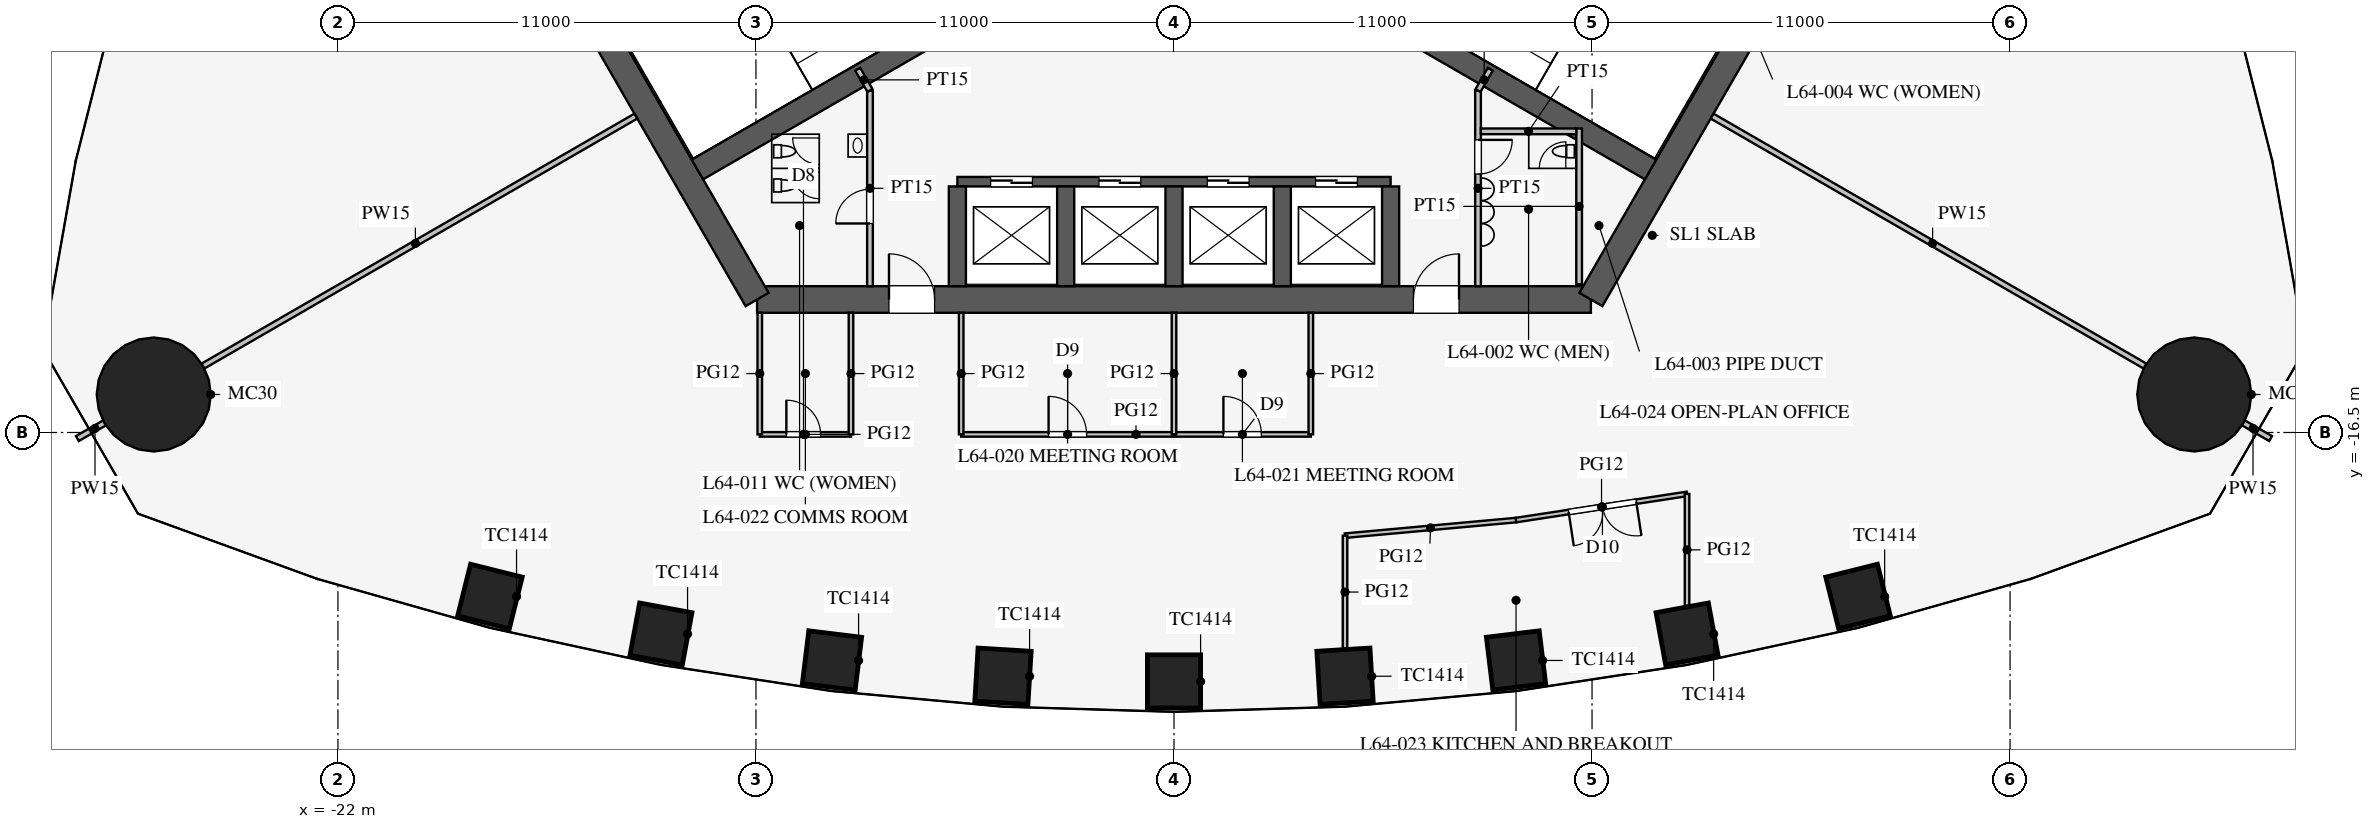
"""IFC4 building model, lengths in metres.
Left out: names, types, materials, properties, quantities, classifications, styles, units other than length and angle.
Written with IfcOpenShell. Run it as: python <this file> out.ifc"""

import sys

from ifc_helpers import new_model, si_unit, direction, frame, frame_2d, origin, origin_2d, place, context, subcontext, project, spatial, rectangle, circle, extrude, element, fill, save


model = new_model("IFC4")
c1 = context("Model", 3, precision=1e-05, world=origin(), true_north=direction((0.0, 1.0)))
c2 = subcontext(c1, "Body", "Model", "MODEL_VIEW")
j1 = project(units=[si_unit("LENGTHUNIT", "METRE"), si_unit("PLANEANGLEUNIT", "RADIAN")], contexts=[c1])
p1 = place(None, origin())
s1 = spatial("IfcSite", under=j1, at=p1, CompositionType="ELEMENT")
p2 = place(p1, origin())
s2 = spatial("IfcBuilding", under=s1, at=p2, CompositionType="ELEMENT")
p3 = place(p2, frame((0.0, 0.0, 280.5)))
s3 = spatial("IfcBuildingStorey", under=s2, at=p3, CompositionType="ELEMENT", Elevation=280.5)
for number, where, z_axis, x_axis in (
    (1, (-18.0, -20.816, 0.0), (0.0, 0.0, 1.0), (0.97, -0.242, 0.0)),
    (2, (-13.5, -21.803, 0.0), (0.0, 0.0, 1.0), (0.983, -0.182, 0.0)),
    (3, (-9.0, -22.499, 0.0), (0.0, 0.0, 1.0), (0.993, -0.121, 0.0)),
    (4, (-4.5, -22.914, 0.0), (0.0, 0.0, 1.0), (0.998, -0.061, 0.0)),
    (5, (0.0, -23.052, 0.0), (0.0, 0.0, 1.0), (1.0, 0.0, 0.0)),
    (6, (4.5, -22.914, 0.0), (0.0, 0.0, 1.0), (0.998, 0.061, 0.0)),
    (7, (9.0, -22.499, 0.0), (0.0, 0.0, 1.0), (0.993, 0.121, 0.0)),
    (8, (13.5, -21.803, 0.0), (0.0, 0.0, 1.0), (0.983, 0.182, 0.0)),
    (9, (18.0, -20.816, 0.0), (0.0, 0.0, 1.0), (0.97, 0.242, 0.0)),
):
    element("IfcColumn", number, at=place(p3, frame(where, z_axis=z_axis, x_axis=x_axis)), inside=s3, PredefinedType="COLUMN", context=c2, shape_type="SweptSolid", body=[
        extrude(rectangle(XDim=1.4, YDim=1.4, at=origin_2d()), origin(), (0.0, 0.0, 1.0), 4.2),
    ])
for number, where, z_axis, x_axis in (
    (10, (26.847, -15.5, 0.0), (0.0, 0.0, 1.0), (1.0, 0.0, 0.0)),
    (11, (-26.847, -15.5, 0.0), (0.0, 0.0, 1.0), (1.0, 0.0, 0.0)),
):
    element("IfcColumn", number, at=place(p3, frame(where, z_axis=z_axis, x_axis=x_axis)), inside=s3, PredefinedType="COLUMN", context=c2, shape_type="SweptSolid", body=[
        extrude(circle(Radius=1.5, at=origin_2d()), origin(), (0.0, 0.0, 1.0), 4.2),
    ])
p4 = place(p3, frame((-10.97, -13.0, 0.0), z_axis=(0.0, 0.0, 1.0), x_axis=(1.0, 0.0, 0.0)))
e12 = element("IfcWall", 12, at=p4, inside=s3, PredefinedType="SHEAR", context=c2, shape_type="SweptSolid", body=[
    extrude(rectangle(XDim=21.939, YDim=0.7, at=frame_2d((10.97, 0.0))), origin(), (0.0, 0.0, 1.0), 4.2),
])
p5 = place(p4, frame((17.27, 0.0, 0.0)))
e13 = element("IfcOpeningElement", 13, at=p5, cuts=e12, PredefinedType="OPENING", context=c2, shape_type="SweptSolid", body=[
    extrude(rectangle(XDim=1.2, YDim=2.1, at=frame_2d((0.6, 1.05))), frame((0.0, 0.36, 0.0), z_axis=(0.0, -1.0, 0.0), x_axis=(1.0, 0.0, 0.0)), (0.0, 0.0, 1.0), 0.72),
])
p6 = place(p4, frame((3.47, 0.0, 0.0)))
e14 = element("IfcOpeningElement", 14, at=p6, cuts=e12, PredefinedType="OPENING", context=c2, shape_type="SweptSolid", body=[
    extrude(rectangle(XDim=1.2, YDim=2.1, at=frame_2d((0.6, 1.05))), frame((0.0, 0.36, 0.0), z_axis=(0.0, -1.0, 0.0), x_axis=(1.0, 0.0, 0.0)), (0.0, 0.0, 1.0), 0.72),
])
for number, where, z_axis, x_axis in (
    (15, (10.97, -13.0, 0.0), (0.0, 0.0, 1.0), (0.5, 0.866, 0.0)),
    (16, (-16.743, -3.0, 0.0), (0.0, 0.0, 1.0), (0.5, -0.866, 0.0)),
):
    element("IfcWall", number, at=place(p3, frame(where, z_axis=z_axis, x_axis=x_axis)), inside=s3, PredefinedType="SHEAR", context=c2, shape_type="SweptSolid", body=[
        extrude(rectangle(XDim=11.547, YDim=0.7, at=frame_2d((5.773, 0.0))), origin(), (0.0, 0.0, 1.0), 4.2),
    ])
p7 = place(p3, frame((-5.7, -9.9, 0.0), z_axis=(0.0, 0.0, 1.0), x_axis=(1.0, 0.0, 0.0)))
e17 = element("IfcWall", 17, at=p7, inside=s3, PredefinedType="SHEAR", context=c2, shape_type="SweptSolid", body=[
    extrude(rectangle(XDim=11.4, YDim=0.25, at=frame_2d((5.7, 0.0))), origin(), (0.0, 0.0, 1.0), 4.2),
])
p8 = place(p7, frame((0.875, 0.0, 0.0)))
e18 = element("IfcOpeningElement", 18, at=p8, cuts=e17, PredefinedType="OPENING", context=c2, shape_type="SweptSolid", body=[
    extrude(rectangle(XDim=1.1, YDim=2.2, at=frame_2d((0.55, 1.1))), frame((0.0, 0.135, 0.0), z_axis=(0.0, -1.0, 0.0), x_axis=(1.0, 0.0, 0.0)), (0.0, 0.0, 1.0), 0.27),
])
p9 = place(p7, frame((3.725, 0.0, 0.0)))
e19 = element("IfcOpeningElement", 19, at=p9, cuts=e17, PredefinedType="OPENING", context=c2, shape_type="SweptSolid", body=[
    extrude(rectangle(XDim=1.1, YDim=2.2, at=frame_2d((0.55, 1.1))), frame((0.0, 0.135, 0.0), z_axis=(0.0, -1.0, 0.0), x_axis=(1.0, 0.0, 0.0)), (0.0, 0.0, 1.0), 0.27),
])
p10 = place(p7, frame((6.575, 0.0, 0.0)))
e20 = element("IfcOpeningElement", 20, at=p10, cuts=e17, PredefinedType="OPENING", context=c2, shape_type="SweptSolid", body=[
    extrude(rectangle(XDim=1.1, YDim=2.2, at=frame_2d((0.55, 1.1))), frame((0.0, 0.135, 0.0), z_axis=(0.0, -1.0, 0.0), x_axis=(1.0, 0.0, 0.0)), (0.0, 0.0, 1.0), 0.27),
])
p11 = place(p7, frame((9.425, 0.0, 0.0)))
e21 = element("IfcOpeningElement", 21, at=p11, cuts=e17, PredefinedType="OPENING", context=c2, shape_type="SweptSolid", body=[
    extrude(rectangle(XDim=1.1, YDim=2.2, at=frame_2d((0.55, 1.1))), frame((0.0, 0.135, 0.0), z_axis=(0.0, -1.0, 0.0), x_axis=(1.0, 0.0, 0.0)), (0.0, 0.0, 1.0), 0.27),
])
for number, where, z_axis, x_axis in (
    (22, (-5.7, -10.025, 0.0), (0.0, 0.0, 1.0), (0.0, -1.0, 0.0)),
    (23, (-2.85, -10.025, 0.0), (0.0, 0.0, 1.0), (0.0, -1.0, 0.0)),
    (24, (0.0, -10.025, 0.0), (0.0, 0.0, 1.0), (0.0, -1.0, 0.0)),
    (25, (2.85, -10.025, 0.0), (0.0, 0.0, 1.0), (0.0, -1.0, 0.0)),
    (26, (5.7, -10.025, 0.0), (0.0, 0.0, 1.0), (0.0, -1.0, 0.0)),
):
    element("IfcWall", number, at=place(p3, frame(where, z_axis=z_axis, x_axis=x_axis)), inside=s3, PredefinedType="SHEAR", context=c2, shape_type="SweptSolid", body=[
        extrude(rectangle(XDim=2.625, YDim=0.45, at=frame_2d((1.312, 0.0))), origin(), (0.0, 0.0, 1.0), 4.2),
    ])
for number, where, z_axis, x_axis in (
    (27, (4.638, -5.016, 0.0), (0.0, 0.0, 1.0), (0.866, -0.5, 0.0)),
    (28, (-4.638, -5.016, 0.0), (0.0, 0.0, 1.0), (-0.866, -0.5, 0.0)),
):
    element("IfcWall", number, at=place(p3, frame(where, z_axis=z_axis, x_axis=x_axis)), inside=s3, PredefinedType="SHEAR", context=c2, shape_type="SweptSolid", body=[
        extrude(rectangle(XDim=9.125, YDim=0.6, at=frame_2d((4.562, 0.0))), origin(), (0.0, 0.0, 1.0), 4.2),
    ])
p12 = place(p3, frame((8.0, -7.5, 0.0), z_axis=(0.0, 0.0, 1.0), x_axis=(0.0, -1.0, 0.0)))
e29 = element("IfcWall", 29, at=p12, inside=s3, PredefinedType="PARTITIONING", context=c2, shape_type="SweptSolid", body=[
    extrude(rectangle(XDim=5.15, YDim=0.15, at=frame_2d((2.575, 0.0))), origin(), (0.0, 0.0, 1.0), 4.0),
])
p13 = place(p12, frame((1.3, 0.0, 0.0)))
e30 = element("IfcOpeningElement", 30, at=p13, cuts=e29, PredefinedType="OPENING", context=c2, shape_type="SweptSolid", body=[
    extrude(rectangle(XDim=0.9, YDim=2.1, at=frame_2d((0.45, 1.05))), frame((0.0, 0.085, 0.0), z_axis=(0.0, -1.0, 0.0), x_axis=(1.0, 0.0, 0.0)), (0.0, 0.0, 1.0), 0.17),
])
p14 = place(p3, frame((-8.0, -7.5, 0.0), z_axis=(0.0, 0.0, 1.0), x_axis=(0.0, -1.0, 0.0)))
e31 = element("IfcWall", 31, at=p14, inside=s3, PredefinedType="PARTITIONING", context=c2, shape_type="SweptSolid", body=[
    extrude(rectangle(XDim=5.15, YDim=0.15, at=frame_2d((2.575, 0.0))), origin(), (0.0, 0.0, 1.0), 4.0),
])
p15 = place(p14, frame((2.6, 0.0, 0.0)))
e32 = element("IfcOpeningElement", 32, at=p15, cuts=e31, PredefinedType="OPENING", context=c2, shape_type="SweptSolid", body=[
    extrude(rectangle(XDim=0.9, YDim=2.1, at=frame_2d((0.45, 1.05))), frame((0.0, 0.085, 0.0), z_axis=(0.0, -1.0, 0.0), x_axis=(1.0, 0.0, 0.0)), (0.0, 0.0, 1.0), 0.17),
])
for number, where, z_axis, x_axis in (
    (33, (8.0, -7.5, 0.0), (0.0, 0.0, 1.0), (0.5, 0.866, 0.0)),
    (34, (-8.0, -7.5, 0.0), (0.0, 0.0, 1.0), (-0.5, 0.866, 0.0)),
):
    element("IfcWall", number, at=place(p3, frame(where, z_axis=z_axis, x_axis=x_axis)), inside=s3, PredefinedType="PARTITIONING", context=c2, shape_type="SweptSolid", body=[
        extrude(rectangle(XDim=0.645, YDim=0.15, at=frame_2d((0.323, 0.0))), origin(), (0.0, 0.0, 1.0), 4.0),
    ])
p16 = place(p3, frame((10.66, -8.5, 0.0), z_axis=(0.0, 0.0, 1.0), x_axis=(0.0, -1.0, 0.0)))
e35 = element("IfcWall", 35, at=p16, inside=s3, PredefinedType="PARTITIONING", context=c2, shape_type="SweptSolid", body=[
    extrude(rectangle(XDim=4.1, YDim=0.15, at=frame_2d((2.05, 0.0))), origin(), (0.0, 0.0, 1.0), 4.0),
])
p17 = place(p3, frame((8.075, -8.575, 0.0), z_axis=(0.0, 0.0, 1.0), x_axis=(1.0, 0.0, 0.0)))
e36 = element("IfcWall", 36, at=p17, inside=s3, PredefinedType="PARTITIONING", context=c2, shape_type="SweptSolid", body=[
    extrude(rectangle(XDim=2.51, YDim=0.15, at=frame_2d((1.255, 0.0))), origin(), (0.0, 0.0, 1.0), 4.0),
])
p18 = place(p3, frame((14.159, -8.175, 0.0), z_axis=(0.0, 0.0, 1.0), x_axis=(0.866026905467, -0.499997399001, 0.0)))
e37 = element("IfcWall", 37, at=p18, inside=s3, PredefinedType="PARTITIONING", context=c2, shape_type="SweptSolid", body=[
    extrude(rectangle(XDim=13.4, YDim=0.15, at=frame_2d((6.7, 0.0))), origin(), (0.0, 0.0, 1.0), 2.5),
])
p19 = place(p3, frame((27.929, -16.125, 0.0), z_axis=(0.0, 0.0, 1.0), x_axis=(0.866086810508, -0.499893625349, 0.0)))
e38 = element("IfcWall", 38, at=p19, inside=s3, PredefinedType="PARTITIONING", context=c2, shape_type="SweptSolid", body=[
    extrude(rectangle(XDim=1.07, YDim=0.15, at=frame_2d((0.535, 0.0))), origin(), (0.0, 0.0, 1.0), 2.5),
])
p20 = place(p3, frame((-14.159, -8.175, 0.0), z_axis=(0.0, 0.0, 1.0), x_axis=(-0.866026905467, -0.499997399001, 0.0)))
e39 = element("IfcWall", 39, at=p20, inside=s3, PredefinedType="PARTITIONING", context=c2, shape_type="SweptSolid", body=[
    extrude(rectangle(XDim=13.4, YDim=0.15, at=frame_2d((6.7, 0.0))), origin(), (0.0, 0.0, 1.0), 2.5),
])
p21 = place(p3, frame((-27.929, -16.125, 0.0), z_axis=(0.0, 0.0, 1.0), x_axis=(-0.866086810508, -0.499893625349, 0.0)))
e40 = element("IfcWall", 40, at=p21, inside=s3, PredefinedType="PARTITIONING", context=c2, shape_type="SweptSolid", body=[
    extrude(rectangle(XDim=1.07, YDim=0.15, at=frame_2d((0.535, 0.0))), origin(), (0.0, 0.0, 1.0), 2.5),
])
p22 = place(p3, frame((0.0, -16.55, 0.0), z_axis=(0.0, 0.0, 1.0), x_axis=(1.0, 0.0, 0.0)))
e41 = element("IfcWall", 41, at=p22, inside=s3, PredefinedType="PARTITIONING", context=c2, shape_type="SweptSolid", body=[
    extrude(rectangle(XDim=3.6, YDim=0.12, at=frame_2d((1.8, 0.0))), origin(), (0.0, 0.0, 1.0), 2.9),
])
p23 = place(p22, frame((1.3, 0.0, 0.15)))
e42 = element("IfcOpeningElement", 42, at=p23, cuts=e41, PredefinedType="OPENING", context=c2, shape_type="SweptSolid", body=[
    extrude(rectangle(XDim=1.0, YDim=2.1, at=frame_2d((0.5, 1.05))), frame((0.0, 0.07, 0.0), z_axis=(0.0, -1.0, 0.0), x_axis=(1.0, 0.0, 0.0)), (0.0, 0.0, 1.0), 0.14),
])
p24 = place(p3, frame((-10.9, -16.55, 0.0), z_axis=(0.0, 0.0, 1.0), x_axis=(1.0, 0.0, 0.0)))
e43 = element("IfcWall", 43, at=p24, inside=s3, PredefinedType="PARTITIONING", context=c2, shape_type="SweptSolid", body=[
    extrude(rectangle(XDim=2.4, YDim=0.12, at=frame_2d((1.2, 0.0))), origin(), (0.0, 0.0, 1.0), 2.9),
])
p25 = place(p24, frame((0.7, 0.0, 0.15)))
e44 = element("IfcOpeningElement", 44, at=p25, cuts=e43, PredefinedType="OPENING", context=c2, shape_type="SweptSolid", body=[
    extrude(rectangle(XDim=0.9, YDim=2.1, at=frame_2d((0.45, 1.05))), frame((0.0, 0.07, 0.0), z_axis=(0.0, -1.0, 0.0), x_axis=(1.0, 0.0, 0.0)), (0.0, 0.0, 1.0), 0.14),
])
p26 = place(p3, frame((-5.6, -16.55, 0.0), z_axis=(0.0, 0.0, 1.0), x_axis=(1.0, 0.0, 0.0)))
e45 = element("IfcWall", 45, at=p26, inside=s3, PredefinedType="PARTITIONING", context=c2, shape_type="SweptSolid", body=[
    extrude(rectangle(XDim=5.6, YDim=0.12, at=frame_2d((2.8, 0.0))), origin(), (0.0, 0.0, 1.0), 2.9),
])
p27 = place(p26, frame((2.3, 0.0, 0.15)))
e46 = element("IfcOpeningElement", 46, at=p27, cuts=e45, PredefinedType="OPENING", context=c2, shape_type="SweptSolid", body=[
    extrude(rectangle(XDim=1.0, YDim=2.1, at=frame_2d((0.5, 1.05))), frame((0.0, 0.07, 0.0), z_axis=(0.0, -1.0, 0.0), x_axis=(1.0, 0.0, 0.0)), (0.0, 0.0, 1.0), 0.14),
])
for number, where, z_axis, x_axis in (
    (47, (3.6, -13.35, 0.0), (0.0, 0.0, 1.0), (0.0, -1.0, 0.0)),
    (48, (0.0, -13.35, 0.0), (0.0, 0.0, 1.0), (0.0, -1.0, 0.0)),
    (49, (-10.9, -13.35, 0.0), (0.0, 0.0, 1.0), (0.0, -1.0, 0.0)),
    (50, (-5.6, -13.35, 0.0), (0.0, 0.0, 1.0), (0.0, -1.0, 0.0)),
    (51, (-8.5, -13.35, 0.0), (0.0, 0.0, 1.0), (0.0, -1.0, 0.0)),
):
    element("IfcWall", number, at=place(p3, frame(where, z_axis=z_axis, x_axis=x_axis)), inside=s3, PredefinedType="PARTITIONING", context=c2, shape_type="SweptSolid", body=[
        extrude(rectangle(XDim=3.2, YDim=0.12, at=frame_2d((1.6, 0.0))), origin(), (0.0, 0.0, 1.0), 2.9),
    ])
p28 = place(p3, frame((4.5, -19.215, 0.0), z_axis=(0.0, 0.0, 1.0), x_axis=(0.995871921504, 0.090769576179, 0.0)))
e52 = element("IfcWall", 52, at=p28, inside=s3, PredefinedType="PARTITIONING", context=c2, shape_type="SweptSolid", body=[
    extrude(rectangle(XDim=4.519, YDim=0.12, at=frame_2d((2.259, 0.0))), origin(), (0.0, 0.0, 1.0), 2.9),
])
p29 = place(p3, frame((9.0, -18.805, 0.0), z_axis=(0.0, 0.0, 1.0), x_axis=(0.988481794406, 0.151339823341, 0.0)))
e53 = element("IfcWall", 53, at=p29, inside=s3, PredefinedType="PARTITIONING", context=c2, shape_type="SweptSolid", body=[
    extrude(rectangle(XDim=4.552, YDim=0.12, at=frame_2d((2.276, 0.0))), origin(), (0.0, 0.0, 1.0), 2.9),
])
p30 = place(p29, frame((1.4, 0.0, 0.15)))
e54 = element("IfcOpeningElement", 54, at=p30, cuts=e53, PredefinedType="OPENING", context=c2, shape_type="SweptSolid", body=[
    extrude(rectangle(XDim=1.8, YDim=2.1, at=frame_2d((0.9, 1.05))), frame((0.0, 0.07, 0.0), z_axis=(0.0, -1.0, 0.0), x_axis=(1.0, 0.0, 0.0)), (0.0, 0.0, 1.0), 0.14),
])
p31 = place(p3, frame((13.5, -18.116, 0.0), z_axis=(0.0, 0.0, 1.0), x_axis=(0.0, -1.0, 0.0)))
e55 = element("IfcWall", 55, at=p31, inside=s3, PredefinedType="PARTITIONING", context=c2, shape_type="SweptSolid", body=[
    extrude(rectangle(XDim=2.944, YDim=0.12, at=frame_2d((1.472, 0.0))), origin(), (0.0, 0.0, 1.0), 2.8),
])
p32 = place(p3, frame((4.5, -19.215, 0.0), z_axis=(0.0, 0.0, 1.0), x_axis=(0.0, -1.0, 0.0)))
e56 = element("IfcWall", 56, at=p32, inside=s3, PredefinedType="PARTITIONING", context=c2, shape_type="SweptSolid", body=[
    extrude(rectangle(XDim=2.967, YDim=0.12, at=frame_2d((1.484, 0.0))), origin(), (0.0, 0.0, 1.0), 2.9),
])
p33 = place(p13, origin())
e57 = element("IfcDoor", 57, at=p33, inside=s3, OperationType="SINGLE_SWING_LEFT", PredefinedType="DOOR", context=c2, shape_type="SweptSolid", body=[
    extrude(rectangle(XDim=0.9, YDim=2.1, at=frame_2d((0.45, 1.05))), frame((0.0, 0.025, 0.0), z_axis=(0.0, -1.0, 0.0), x_axis=(1.0, 0.0, 0.0)), (0.0, 0.0, 1.0), 0.05),
])
fill(e30, e57)
p34 = place(p15, frame((0.9, 0.0, 0.0), z_axis=(0.0, 0.0, 1.0), x_axis=(-1.0, 0.0, 0.0)))
e58 = element("IfcDoor", 58, at=p34, inside=s3, OperationType="SINGLE_SWING_LEFT", PredefinedType="DOOR", context=c2, shape_type="SweptSolid", body=[
    extrude(rectangle(XDim=0.9, YDim=2.1, at=frame_2d((0.45, 1.05))), frame((0.0, 0.025, 0.0), z_axis=(0.0, -1.0, 0.0), x_axis=(1.0, 0.0, 0.0)), (0.0, 0.0, 1.0), 0.05),
])
fill(e32, e58)
p35 = place(p5, origin())
e59 = element("IfcDoor", 59, at=p35, inside=s3, OperationType="SINGLE_SWING_RIGHT", PredefinedType="DOOR", context=c2, shape_type="SweptSolid", body=[
    extrude(rectangle(XDim=1.2, YDim=2.1, at=frame_2d((0.6, 1.05))), frame((0.0, 0.025, 0.0), z_axis=(0.0, -1.0, 0.0), x_axis=(1.0, 0.0, 0.0)), (0.0, 0.0, 1.0), 0.05),
])
fill(e13, e59)
p36 = place(p6, origin())
e60 = element("IfcDoor", 60, at=p36, inside=s3, OperationType="SINGLE_SWING_LEFT", PredefinedType="DOOR", context=c2, shape_type="SweptSolid", body=[
    extrude(rectangle(XDim=1.2, YDim=2.1, at=frame_2d((0.6, 1.05))), frame((0.0, 0.025, 0.0), z_axis=(0.0, -1.0, 0.0), x_axis=(1.0, 0.0, 0.0)), (0.0, 0.0, 1.0), 0.05),
])
fill(e14, e60)
p37 = place(p27, origin())
e61 = element("IfcDoor", 61, at=p37, inside=s3, OperationType="SINGLE_SWING_LEFT", PredefinedType="DOOR", context=c2, shape_type="SweptSolid", body=[
    extrude(rectangle(XDim=1.0, YDim=2.1, at=frame_2d((0.5, 1.05))), frame((0.0, 0.025, 0.0), z_axis=(0.0, -1.0, 0.0), x_axis=(1.0, 0.0, 0.0)), (0.0, 0.0, 1.0), 0.05),
])
fill(e46, e61)
p38 = place(p23, origin())
e62 = element("IfcDoor", 62, at=p38, inside=s3, OperationType="SINGLE_SWING_LEFT", PredefinedType="DOOR", context=c2, shape_type="SweptSolid", body=[
    extrude(rectangle(XDim=1.0, YDim=2.1, at=frame_2d((0.5, 1.05))), frame((0.0, 0.025, 0.0), z_axis=(0.0, -1.0, 0.0), x_axis=(1.0, 0.0, 0.0)), (0.0, 0.0, 1.0), 0.05),
])
fill(e42, e62)
p39 = place(p25, origin())
e63 = element("IfcDoor", 63, at=p39, inside=s3, OperationType="SINGLE_SWING_LEFT", PredefinedType="DOOR", context=c2, shape_type="SweptSolid", body=[
    extrude(rectangle(XDim=0.9, YDim=2.1, at=frame_2d((0.45, 1.05))), frame((0.0, 0.025, 0.0), z_axis=(0.0, -1.0, 0.0), x_axis=(1.0, 0.0, 0.0)), (0.0, 0.0, 1.0), 0.05),
])
fill(e44, e63)
p40 = place(p30, frame((1.8, 0.0, 0.0), z_axis=(0.0, 0.0, 1.0), x_axis=(-1.0, 0.0, 0.0)))
e64 = element("IfcDoor", 64, at=p40, inside=s3, OperationType="DOUBLE_DOOR_SINGLE_SWING", PredefinedType="DOOR", context=c2, shape_type="SweptSolid", body=[
    extrude(rectangle(XDim=1.8, YDim=2.1, at=frame_2d((0.9, 1.05))), frame((0.0, 0.025, 0.0), z_axis=(0.0, -1.0, 0.0), x_axis=(1.0, 0.0, 0.0)), (0.0, 0.0, 1.0), 0.05),
])
fill(e54, e64)
p41 = place(p8, origin())
e65 = element("IfcDoor", 65, at=p41, inside=s3, OperationType="DOUBLE_DOOR_SLIDING", PredefinedType="DOOR", context=c2, shape_type="SweptSolid", body=[
    extrude(rectangle(XDim=1.1, YDim=2.2, at=frame_2d((0.55, 1.1))), frame((0.0, 0.025, 0.0), z_axis=(0.0, -1.0, 0.0), x_axis=(1.0, 0.0, 0.0)), (0.0, 0.0, 1.0), 0.05),
])
fill(e18, e65)
p42 = place(p9, origin())
e66 = element("IfcDoor", 66, at=p42, inside=s3, OperationType="DOUBLE_DOOR_SLIDING", PredefinedType="DOOR", context=c2, shape_type="SweptSolid", body=[
    extrude(rectangle(XDim=1.1, YDim=2.2, at=frame_2d((0.55, 1.1))), frame((0.0, 0.025, 0.0), z_axis=(0.0, -1.0, 0.0), x_axis=(1.0, 0.0, 0.0)), (0.0, 0.0, 1.0), 0.05),
])
fill(e19, e66)
p43 = place(p10, origin())
e67 = element("IfcDoor", 67, at=p43, inside=s3, OperationType="DOUBLE_DOOR_SLIDING", PredefinedType="DOOR", context=c2, shape_type="SweptSolid", body=[
    extrude(rectangle(XDim=1.1, YDim=2.2, at=frame_2d((0.55, 1.1))), frame((0.0, 0.025, 0.0), z_axis=(0.0, -1.0, 0.0), x_axis=(1.0, 0.0, 0.0)), (0.0, 0.0, 1.0), 0.05),
])
fill(e20, e67)
p44 = place(p11, origin())
e68 = element("IfcDoor", 68, at=p44, inside=s3, OperationType="DOUBLE_DOOR_SLIDING", PredefinedType="DOOR", context=c2, shape_type="SweptSolid", body=[
    extrude(rectangle(XDim=1.1, YDim=2.2, at=frame_2d((0.55, 1.1))), frame((0.0, 0.025, 0.0), z_axis=(0.0, -1.0, 0.0), x_axis=(1.0, 0.0, 0.0)), (0.0, 0.0, 1.0), 0.05),
])
fill(e21, e68)
save(model, sys.argv[1])
